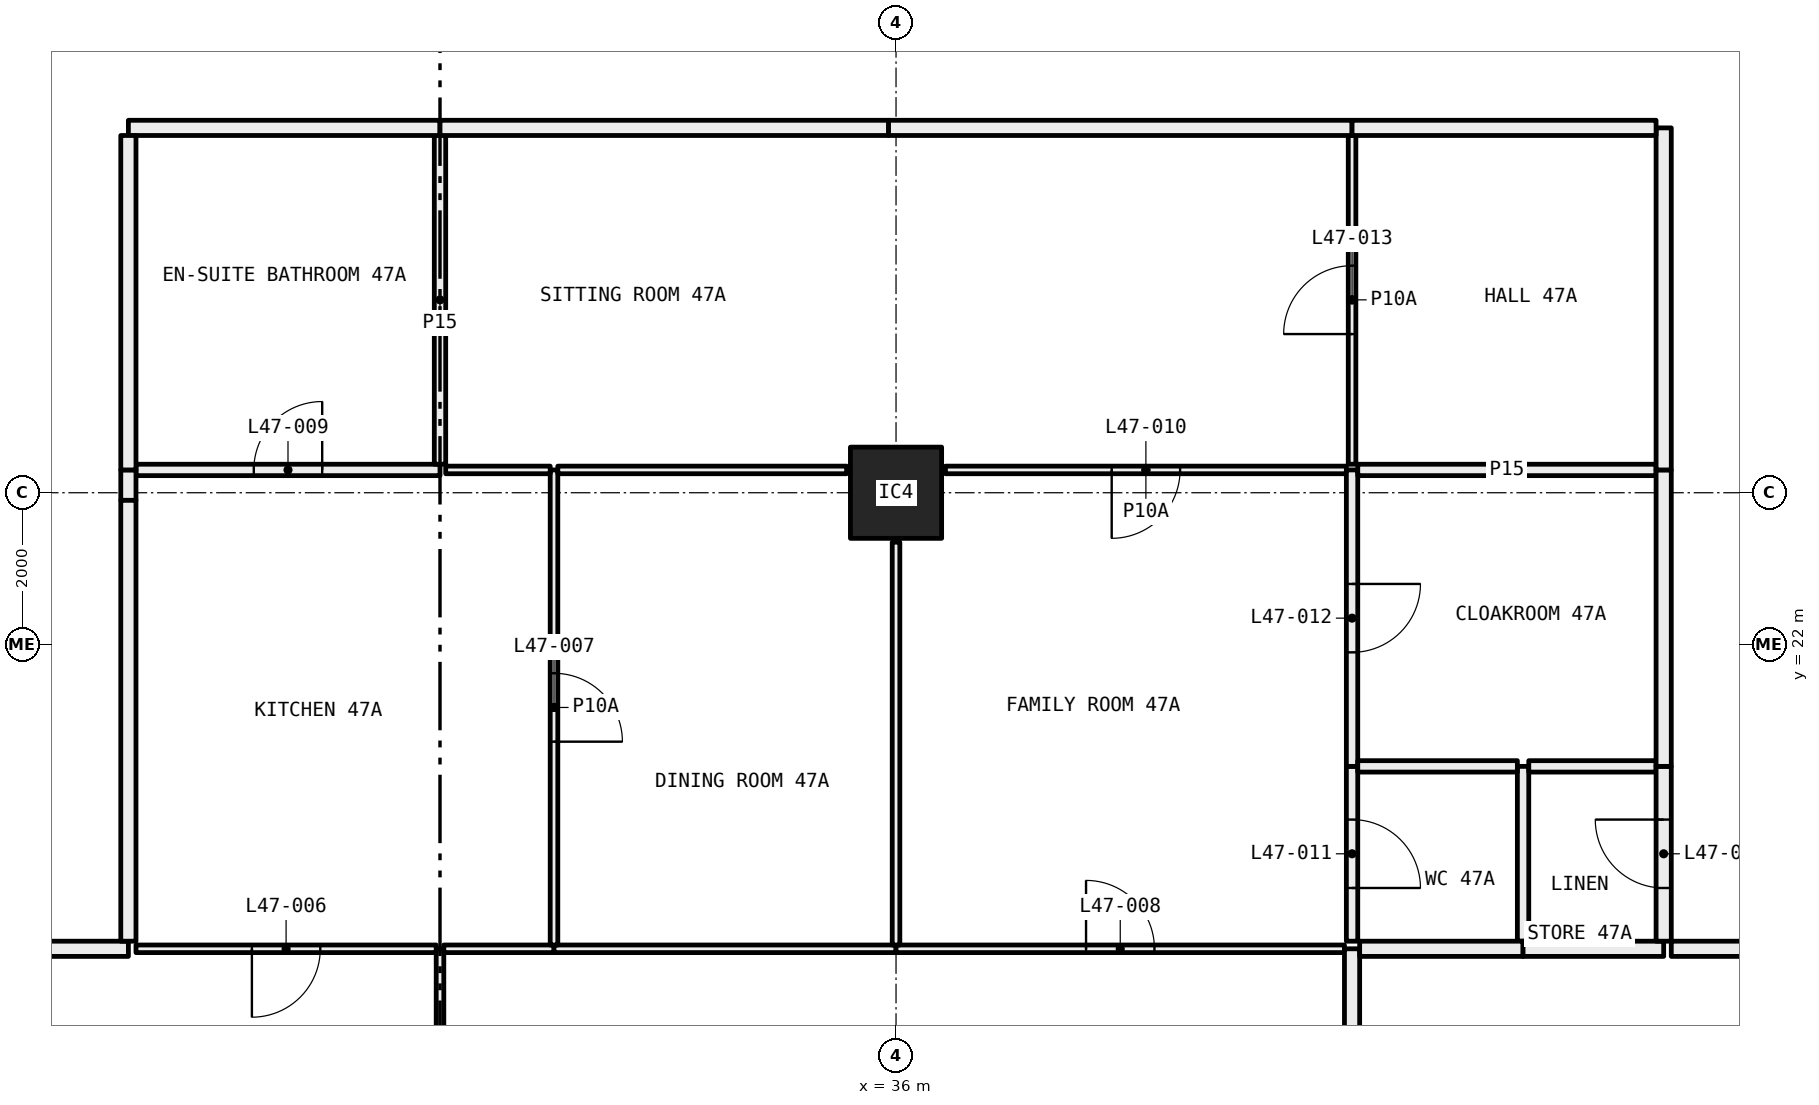
"""IFC4 building model, lengths in metres.
Left out: names, types, materials, properties, quantities, classifications, styles, units other than length and angle.
Written with IfcOpenShell. Run it as: python <this file> out.ifc"""

import sys

from ifc_helpers import new_model, si_unit, direction, frame, frame_2d, origin, origin_2d, place, context, subcontext, project, spatial, rectangle, hollow_rectangle, extrude, element, fill, save


model = new_model("IFC4")
c1 = context("Model", 3, precision=1e-05, world=origin(), true_north=direction((0.0, 1.0)))
c2 = subcontext(c1, "Body", "Model", "MODEL_VIEW")
j1 = project(units=[si_unit("LENGTHUNIT", "METRE"), si_unit("PLANEANGLEUNIT", "RADIAN")], contexts=[c1])
p1 = place(None, origin())
s1 = spatial("IfcSite", under=j1, at=p1, CompositionType="ELEMENT")
p2 = place(p1, origin())
s2 = spatial("IfcBuilding", under=s1, at=p2, CompositionType="ELEMENT")
p3 = place(p2, frame((0.0, 0.0, 178.95)))
s3 = spatial("IfcBuildingStorey", under=s2, at=p3, CompositionType="ELEMENT", Elevation=178.95)
p4 = place(p3, frame((36.0, 24.0, 0.0), z_axis=(0.0, 0.0, 1.0), x_axis=(1.0, 0.0, 0.0)))
e1 = element("IfcColumn", 1, at=p4, inside=s3, PredefinedType="COLUMN", context=c2, shape_type="SweptSolid", body=[
    extrude(hollow_rectangle(XDim=1.2, YDim=1.2, WallThickness=0.05, at=origin_2d()), origin(), (0.0, 0.0, 1.0), 3.05),
])
p5 = place(p3, frame((30.0, 12.72, 0.0), z_axis=(0.0, 0.0, 1.0), x_axis=(0.0, 1.0, 0.0)))
e2 = element("IfcWall", 2, at=p5, inside=s3, PredefinedType="PARTITIONING", context=c2, shape_type="SweptSolid", body=[
    extrude(rectangle(XDim=5.28, YDim=0.1, at=frame_2d((2.64, 0.0))), origin(), (0.0, 0.0, 1.0), 3.05),
])
p6 = place(p5, frame((2.19, 0.0, 0.0)))
e3 = element("IfcOpeningElement", 3, at=p6, cuts=e2, PredefinedType="OPENING", context=c2, shape_type="SweptSolid", body=[
    extrude(rectangle(XDim=0.9, YDim=2.1, at=frame_2d((0.45, 1.05))), frame((0.0, 0.06, 0.0), z_axis=(0.0, -1.0, 0.0), x_axis=(1.0, 0.0, 0.0)), (0.0, 0.0, 1.0), 0.12),
])
p7 = place(p3, frame((29.95, 18.0, 0.0), z_axis=(0.0, 0.0, 1.0), x_axis=(-1.0, 0.0, 0.0)))
e4 = element("IfcWall", 4, at=p7, inside=s3, PredefinedType="PARTITIONING", context=c2, shape_type="SweptSolid", body=[
    extrude(rectangle(XDim=3.95, YDim=0.1, at=frame_2d((1.975, 0.0))), origin(), (0.0, 0.0, 1.0), 3.05),
])
p8 = place(p7, frame((1.525, 0.0, 0.0)))
e5 = element("IfcOpeningElement", 5, at=p8, cuts=e4, PredefinedType="OPENING", context=c2, shape_type="SweptSolid", body=[
    extrude(rectangle(XDim=0.9, YDim=2.1, at=frame_2d((0.45, 1.05))), frame((0.0, 0.06, 0.0), z_axis=(0.0, -1.0, 0.0), x_axis=(1.0, 0.0, 0.0)), (0.0, 0.0, 1.0), 0.12),
])
p9 = place(p3, frame((25.9, 18.0, 0.0), z_axis=(0.0, 0.0, 1.0), x_axis=(-1.0, 0.0, 0.0)))
e6 = element("IfcWall", 6, at=p9, inside=s3, PredefinedType="PARTITIONING", context=c2, shape_type="SweptSolid", body=[
    extrude(rectangle(XDim=1.9, YDim=0.2, at=frame_2d((0.95, 0.0))), origin(), (0.0, 0.0, 1.0), 3.05),
])
p10 = place(p3, frame((31.5, 18.0, 0.0), z_axis=(0.0, 0.0, 1.0), x_axis=(-1.0, 0.0, 0.0)))
e7 = element("IfcWall", 7, at=p10, inside=s3, PredefinedType="PARTITIONING", context=c2, shape_type="SweptSolid", body=[
    extrude(rectangle(XDim=1.45, YDim=0.1, at=frame_2d((0.725, 0.0))), origin(), (0.0, 0.0, 1.0), 3.05),
])
p11 = place(p3, frame((36.0, 18.0, 0.0), z_axis=(0.0, 0.0, 1.0), x_axis=(-1.0, 0.0, 0.0)))
e8 = element("IfcWall", 8, at=p11, inside=s3, PredefinedType="PARTITIONING", context=c2, shape_type="SweptSolid", body=[
    extrude(rectangle(XDim=4.5, YDim=0.1, at=frame_2d((2.25, 0.0))), origin(), (0.0, 0.0, 1.0), 2.45),
])
p12 = place(p3, frame((41.9, 18.0, 0.0), z_axis=(0.0, 0.0, 1.0), x_axis=(-1.0, 0.0, 0.0)))
e9 = element("IfcWall", 9, at=p12, inside=s3, PredefinedType="PARTITIONING", context=c2, shape_type="SweptSolid", body=[
    extrude(rectangle(XDim=5.9, YDim=0.1, at=frame_2d((2.95, 0.0))), origin(), (0.0, 0.0, 1.0), 2.45),
])
p13 = place(p12, frame((2.5, 0.0, 0.0)))
e10 = element("IfcOpeningElement", 10, at=p13, cuts=e9, PredefinedType="OPENING", context=c2, shape_type="SweptSolid", body=[
    extrude(rectangle(XDim=0.9, YDim=2.1, at=frame_2d((0.45, 1.05))), frame((0.0, 0.06, 0.0), z_axis=(0.0, -1.0, 0.0), x_axis=(1.0, 0.0, 0.0)), (0.0, 0.0, 1.0), 0.12),
])
p14 = place(p3, frame((42.0, 12.72, 0.0), z_axis=(0.0, 0.0, 1.0), x_axis=(0.0, 1.0, 0.0)))
e11 = element("IfcWall", 11, at=p14, inside=s3, PredefinedType="PARTITIONING", context=c2, shape_type="SweptSolid", body=[
    extrude(rectangle(XDim=5.28, YDim=0.2, at=frame_2d((2.64, 0.0))), origin(), (0.0, 0.0, 1.0), 3.05),
])
p15 = place(p3, frame((31.5, 18.05, 0.0), z_axis=(0.0, 0.0, 1.0), x_axis=(0.0, 1.0, 0.0)))
e12 = element("IfcWall", 12, at=p15, inside=s3, PredefinedType="PARTITIONING", context=c2, shape_type="SweptSolid", body=[
    extrude(rectangle(XDim=6.25, YDim=0.1, at=frame_2d((3.125, 0.0))), origin(), (0.0, 0.0, 1.0), 2.45),
])
p16 = place(p15, frame((2.675, 0.0, 0.0)))
e13 = element("IfcOpeningElement", 13, at=p16, cuts=e12, PredefinedType="OPENING", context=c2, shape_type="SweptSolid", body=[
    extrude(rectangle(XDim=0.9, YDim=2.1, at=frame_2d((0.45, 1.05))), frame((0.0, 0.06, 0.0), z_axis=(0.0, -1.0, 0.0), x_axis=(1.0, 0.0, 0.0)), (0.0, 0.0, 1.0), 0.12),
])
p17 = place(p3, frame((30.0, 24.3, 0.0), z_axis=(0.0, 0.0, 1.0), x_axis=(-1.0, 0.0, 0.0)))
e14 = element("IfcWall", 14, at=p17, inside=s3, PredefinedType="PARTITIONING", context=c2, shape_type="SweptSolid", body=[
    extrude(rectangle(XDim=4.0, YDim=0.15, at=frame_2d((2.0, 0.0))), origin(), (0.0, 0.0, 1.0), 3.05),
])
p18 = place(p17, frame((1.55, 0.0, 0.0)))
e15 = element("IfcOpeningElement", 15, at=p18, cuts=e14, PredefinedType="OPENING", context=c2, shape_type="SweptSolid", body=[
    extrude(rectangle(XDim=0.9, YDim=2.1, at=frame_2d((0.45, 1.05))), frame((0.0, 0.085, 0.0), z_axis=(0.0, -1.0, 0.0), x_axis=(1.0, 0.0, 0.0)), (0.0, 0.0, 1.0), 0.17),
])
p19 = place(p3, frame((31.45, 24.3, 0.0), z_axis=(0.0, 0.0, 1.0), x_axis=(-1.0, 0.0, 0.0)))
e16 = element("IfcWall", 16, at=p19, inside=s3, PredefinedType="PARTITIONING", context=c2, shape_type="SweptSolid", body=[
    extrude(rectangle(XDim=1.375, YDim=0.1, at=frame_2d((0.688, 0.0))), origin(), (0.0, 0.0, 1.0), 3.05),
])
p20 = place(p3, frame((25.9, 24.3, 0.0), z_axis=(0.0, 0.0, 1.0), x_axis=(0.0, -1.0, 0.0)))
e17 = element("IfcWall", 17, at=p20, inside=s3, PredefinedType="PARTITIONING", context=c2, shape_type="SweptSolid", body=[
    extrude(rectangle(XDim=0.4, YDim=0.2, at=frame_2d((0.2, 0.0))), origin(), (0.0, 0.0, 1.0), 2.45),
])
p21 = place(p3, frame((25.9, 23.9, 0.0), z_axis=(0.0, 0.0, 1.0), x_axis=(0.0, -1.0, 0.0)))
e18 = element("IfcWall", 18, at=p21, inside=s3, PredefinedType="PARTITIONING", context=c2, shape_type="SweptSolid", body=[
    extrude(rectangle(XDim=5.8, YDim=0.2, at=frame_2d((2.9, 0.0))), origin(), (0.0, 0.0, 1.0), 3.05),
])
p22 = place(p3, frame((36.0, 18.05, 0.0), z_axis=(0.0, 0.0, 1.0), x_axis=(0.0, 1.0, 0.0)))
e19 = element("IfcWall", 19, at=p22, inside=s3, PredefinedType="PARTITIONING", context=c2, shape_type="SweptSolid", body=[
    extrude(rectangle(XDim=5.3, YDim=0.1, at=frame_2d((2.65, 0.0))), origin(), (0.0, 0.0, 1.0), 2.45),
])
p23 = place(p3, frame((35.35, 24.3, 0.0), z_axis=(0.0, 0.0, 1.0), x_axis=(-1.0, 0.0, 0.0)))
e20 = element("IfcWall", 20, at=p23, inside=s3, PredefinedType="PARTITIONING", context=c2, shape_type="SweptSolid", body=[
    extrude(rectangle(XDim=3.8, YDim=0.1, at=frame_2d((1.9, 0.0))), origin(), (0.0, 0.0, 1.0), 3.05),
])
p24 = place(p3, frame((41.925, 24.3, 0.0), z_axis=(0.0, 0.0, 1.0), x_axis=(-1.0, 0.0, 0.0)))
e21 = element("IfcWall", 21, at=p24, inside=s3, PredefinedType="PARTITIONING", context=c2, shape_type="SweptSolid", body=[
    extrude(rectangle(XDim=5.275, YDim=0.1, at=frame_2d((2.638, 0.0))), origin(), (0.0, 0.0, 1.0), 3.05),
])
p25 = place(p24, frame((2.188, 0.0, 0.0)))
e22 = element("IfcOpeningElement", 22, at=p25, cuts=e21, PredefinedType="OPENING", context=c2, shape_type="SweptSolid", body=[
    extrude(rectangle(XDim=0.9, YDim=2.1, at=frame_2d((0.45, 1.05))), frame((0.0, 0.06, 0.0), z_axis=(0.0, -1.0, 0.0), x_axis=(1.0, 0.0, 0.0)), (0.0, 0.0, 1.0), 0.12),
])
p26 = place(p3, frame((42.0, 18.1, 0.0), z_axis=(0.0, 0.0, 1.0), x_axis=(0.0, 1.0, 0.0)))
e23 = element("IfcWall", 23, at=p26, inside=s3, PredefinedType="PARTITIONING", context=c2, shape_type="SweptSolid", body=[
    extrude(rectangle(XDim=2.3, YDim=0.15, at=frame_2d((1.15, 0.0))), origin(), (0.0, 0.0, 1.0), 3.05),
])
p27 = place(p26, frame((0.7, 0.0, 0.0)))
e24 = element("IfcOpeningElement", 24, at=p27, cuts=e23, PredefinedType="OPENING", context=c2, shape_type="SweptSolid", body=[
    extrude(rectangle(XDim=0.9, YDim=2.1, at=frame_2d((0.45, 1.05))), frame((0.0, 0.085, 0.0), z_axis=(0.0, -1.0, 0.0), x_axis=(1.0, 0.0, 0.0)), (0.0, 0.0, 1.0), 0.17),
])
p28 = place(p3, frame((42.0, 20.4, 0.0), z_axis=(0.0, 0.0, 1.0), x_axis=(0.0, 1.0, 0.0)))
e25 = element("IfcWall", 25, at=p28, inside=s3, PredefinedType="PARTITIONING", context=c2, shape_type="SweptSolid", body=[
    extrude(rectangle(XDim=3.9, YDim=0.15, at=frame_2d((1.95, 0.0))), origin(), (0.0, 0.0, 1.0), 2.45),
])
p29 = place(p28, frame((1.5, 0.0, 0.0)))
e26 = element("IfcOpeningElement", 26, at=p29, cuts=e25, PredefinedType="OPENING", context=c2, shape_type="SweptSolid", body=[
    extrude(rectangle(XDim=0.9, YDim=2.1, at=frame_2d((0.45, 1.05))), frame((0.0, 0.085, 0.0), z_axis=(0.0, -1.0, 0.0), x_axis=(1.0, 0.0, 0.0)), (0.0, 0.0, 1.0), 0.17),
])
p30 = place(p3, frame((30.0, 24.375, 0.0), z_axis=(0.0, 0.0, 1.0), x_axis=(0.0, 1.0, 0.0)))
e27 = element("IfcWall", 27, at=p30, inside=s3, PredefinedType="PARTITIONING", context=c2, shape_type="SweptSolid", body=[
    extrude(rectangle(XDim=4.325, YDim=0.15, at=frame_2d((2.163, 0.0))), origin(), (0.0, 0.0, 1.0), 3.05),
])
p31 = place(p3, frame((30.0, 28.8, 0.0), z_axis=(0.0, 0.0, 1.0), x_axis=(-1.0, 0.0, 0.0)))
e28 = element("IfcWall", 28, at=p31, inside=s3, PredefinedType="PARTITIONING", context=c2, shape_type="SweptSolid", body=[
    extrude(rectangle(XDim=4.1, YDim=0.2, at=frame_2d((2.05, 0.0))), origin(), (0.0, 0.0, 1.0), 3.05),
])
p32 = place(p3, frame((25.9, 28.7, 0.0), z_axis=(0.0, 0.0, 1.0), x_axis=(0.0, -1.0, 0.0)))
e29 = element("IfcWall", 29, at=p32, inside=s3, PredefinedType="PARTITIONING", context=c2, shape_type="SweptSolid", body=[
    extrude(rectangle(XDim=4.4, YDim=0.2, at=frame_2d((2.2, 0.0))), origin(), (0.0, 0.0, 1.0), 3.05),
])
p33 = place(p3, frame((42.0, 24.375, 0.0), z_axis=(0.0, 0.0, 1.0), x_axis=(0.0, 1.0, 0.0)))
e30 = element("IfcWall", 30, at=p33, inside=s3, PredefinedType="PARTITIONING", context=c2, shape_type="SweptSolid", body=[
    extrude(rectangle(XDim=4.325, YDim=0.1, at=frame_2d((2.163, 0.0))), origin(), (0.0, 0.0, 1.0), 3.05),
])
p34 = place(p33, frame((1.712, 0.0, 0.0)))
e31 = element("IfcOpeningElement", 31, at=p34, cuts=e30, PredefinedType="OPENING", context=c2, shape_type="SweptSolid", body=[
    extrude(rectangle(XDim=0.9, YDim=2.1, at=frame_2d((0.45, 1.05))), frame((0.0, 0.06, 0.0), z_axis=(0.0, -1.0, 0.0), x_axis=(1.0, 0.0, 0.0)), (0.0, 0.0, 1.0), 0.12),
])
p35 = place(p3, frame((42.0, 28.8, 0.0), z_axis=(0.0, 0.0, 1.0), x_axis=(-1.0, 0.0, 0.0)))
e32 = element("IfcWall", 32, at=p35, inside=s3, PredefinedType="PARTITIONING", context=c2, shape_type="SweptSolid", body=[
    extrude(rectangle(XDim=6.1, YDim=0.2, at=frame_2d((3.05, 0.0))), origin(), (0.0, 0.0, 1.0), 2.45),
])
p36 = place(p3, frame((35.9, 28.8, 0.0), z_axis=(0.0, 0.0, 1.0), x_axis=(-1.0, 0.0, 0.0)))
e33 = element("IfcWall", 33, at=p36, inside=s3, PredefinedType="PARTITIONING", context=c2, shape_type="SweptSolid", body=[
    extrude(rectangle(XDim=5.9, YDim=0.2, at=frame_2d((2.95, 0.0))), origin(), (0.0, 0.0, 1.0), 3.05),
])
p37 = place(p3, frame((44.25, 18.1, 0.0), z_axis=(0.0, 0.0, 1.0), x_axis=(0.0, 1.0, 0.0)))
e34 = element("IfcWall", 34, at=p37, inside=s3, PredefinedType="PARTITIONING", context=c2, shape_type="SweptSolid", body=[
    extrude(rectangle(XDim=2.3, YDim=0.15, at=frame_2d((1.15, 0.0))), origin(), (0.0, 0.0, 1.0), 3.05),
])
p38 = place(p3, frame((44.175, 20.4, 0.0), z_axis=(0.0, 0.0, 1.0), x_axis=(-1.0, 0.0, 0.0)))
e35 = element("IfcWall", 35, at=p38, inside=s3, PredefinedType="PARTITIONING", context=c2, shape_type="SweptSolid", body=[
    extrude(rectangle(XDim=2.1, YDim=0.15, at=frame_2d((1.05, 0.0))), origin(), (0.0, 0.0, 1.0), 3.05),
])
p39 = place(p3, frame((42.1, 18.0, 0.0), z_axis=(0.0, 0.0, 1.0), x_axis=(1.0, 0.0, 0.0)))
e36 = element("IfcWall", 36, at=p39, inside=s3, PredefinedType="PARTITIONING", context=c2, shape_type="SweptSolid", body=[
    extrude(rectangle(XDim=2.15, YDim=0.2, at=frame_2d((1.075, 0.0))), origin(), (0.0, 0.0, 1.0), 3.05),
])
p40 = place(p3, frame((46.0, 20.4, 0.0), z_axis=(0.0, 0.0, 1.0), x_axis=(-1.0, 0.0, 0.0)))
e37 = element("IfcWall", 37, at=p40, inside=s3, PredefinedType="PARTITIONING", context=c2, shape_type="SweptSolid", body=[
    extrude(rectangle(XDim=1.675, YDim=0.15, at=frame_2d((0.837, 0.0))), origin(), (0.0, 0.0, 1.0), 3.05),
])
p41 = place(p3, frame((44.25, 18.0, 0.0), z_axis=(0.0, 0.0, 1.0), x_axis=(1.0, 0.0, 0.0)))
e38 = element("IfcWall", 38, at=p41, inside=s3, PredefinedType="PARTITIONING", context=c2, shape_type="SweptSolid", body=[
    extrude(rectangle(XDim=1.85, YDim=0.2, at=frame_2d((0.925, 0.0))), origin(), (0.0, 0.0, 1.0), 3.05),
])
p42 = place(p3, frame((46.1, 18.1, 0.0), z_axis=(0.0, 0.0, 1.0), x_axis=(0.0, 1.0, 0.0)))
e39 = element("IfcWall", 39, at=p42, inside=s3, PredefinedType="PARTITIONING", context=c2, shape_type="SweptSolid", body=[
    extrude(rectangle(XDim=2.3, YDim=0.2, at=frame_2d((1.15, 0.0))), origin(), (0.0, 0.0, 1.0), 3.05),
])
p43 = place(p42, frame((0.7, 0.0, 0.0)))
e40 = element("IfcOpeningElement", 40, at=p43, cuts=e39, PredefinedType="OPENING", context=c2, shape_type="SweptSolid", body=[
    extrude(rectangle(XDim=0.9, YDim=2.1, at=frame_2d((0.45, 1.05))), frame((0.0, 0.11, 0.0), z_axis=(0.0, -1.0, 0.0), x_axis=(1.0, 0.0, 0.0)), (0.0, 0.0, 1.0), 0.22),
])
p44 = place(p3, frame((46.0, 24.3, 0.0), z_axis=(0.0, 0.0, 1.0), x_axis=(-1.0, 0.0, 0.0)))
e41 = element("IfcWall", 41, at=p44, inside=s3, PredefinedType="PARTITIONING", context=c2, shape_type="SweptSolid", body=[
    extrude(rectangle(XDim=3.925, YDim=0.15, at=frame_2d((1.962, 0.0))), origin(), (0.0, 0.0, 1.0), 3.05),
])
p45 = place(p3, frame((46.1, 20.4, 0.0), z_axis=(0.0, 0.0, 1.0), x_axis=(0.0, 1.0, 0.0)))
e42 = element("IfcWall", 42, at=p45, inside=s3, PredefinedType="PARTITIONING", context=c2, shape_type="SweptSolid", body=[
    extrude(rectangle(XDim=3.9, YDim=0.2, at=frame_2d((1.95, 0.0))), origin(), (0.0, 0.0, 1.0), 2.45),
])
p46 = place(p3, frame((46.1, 24.3, 0.0), z_axis=(0.0, 0.0, 1.0), x_axis=(0.0, 1.0, 0.0)))
e43 = element("IfcWall", 43, at=p46, inside=s3, PredefinedType="PARTITIONING", context=c2, shape_type="SweptSolid", body=[
    extrude(rectangle(XDim=4.5, YDim=0.2, at=frame_2d((2.25, 0.0))), origin(), (0.0, 0.0, 1.0), 3.05),
])
p47 = place(p3, frame((46.0, 28.8, 0.0), z_axis=(0.0, 0.0, 1.0), x_axis=(-1.0, 0.0, 0.0)))
e44 = element("IfcWall", 44, at=p47, inside=s3, PredefinedType="PARTITIONING", context=c2, shape_type="SweptSolid", body=[
    extrude(rectangle(XDim=4.0, YDim=0.2, at=frame_2d((2.0, 0.0))), origin(), (0.0, 0.0, 1.0), 3.05),
])
p48 = place(p3, frame((53.28, 18.0, 0.0), z_axis=(0.0, 0.0, 1.0), x_axis=(-1.0, 0.0, 0.0)))
e45 = element("IfcWall", 45, at=p48, inside=s3, PredefinedType="PARTITIONING", context=c2, shape_type="SweptSolid", body=[
    extrude(rectangle(XDim=7.08, YDim=0.2, at=frame_2d((3.54, 0.0))), origin(), (0.0, 0.0, 1.0), 3.05),
])
p49 = place(p48, frame((3.09, 0.0, 0.0)))
e46 = element("IfcOpeningElement", 46, at=p49, cuts=e45, PredefinedType="OPENING", context=c2, shape_type="SweptSolid", body=[
    extrude(rectangle(XDim=0.9, YDim=2.1, at=frame_2d((0.45, 1.05))), frame((0.0, 0.11, 0.0), z_axis=(0.0, -1.0, 0.0), x_axis=(1.0, 0.0, 0.0)), (0.0, 0.0, 1.0), 0.22),
])
p50 = place(p8, origin())
e47 = element("IfcDoor", 47, at=p50, inside=s3, OperationType="SINGLE_SWING_LEFT", PredefinedType="DOOR", context=c2, shape_type="SweptSolid", body=[
    extrude(rectangle(XDim=0.9, YDim=2.1, at=frame_2d((0.45, 1.05))), frame((0.0, 0.025, 0.0), z_axis=(0.0, -1.0, 0.0), x_axis=(1.0, 0.0, 0.0)), (0.0, 0.0, 1.0), 0.05),
])
fill(e5, e47)
p51 = place(p16, frame((0.9, 0.0, 0.0), x_axis=(-1.0, 0.0, 0.0)))
e48 = element("IfcDoor", 48, at=p51, inside=s3, OperationType="SINGLE_SWING_LEFT", PredefinedType="DOOR", context=c2, shape_type="SweptSolid", body=[
    extrude(rectangle(XDim=0.9, YDim=2.1, at=frame_2d((0.45, 1.05))), frame((0.0, 0.025, 0.0), z_axis=(0.0, -1.0, 0.0), x_axis=(1.0, 0.0, 0.0)), (0.0, 0.0, 1.0), 0.05),
])
fill(e13, e48)
p52 = place(p13, frame((0.9, 0.0, 0.0), x_axis=(-1.0, 0.0, 0.0)))
e49 = element("IfcDoor", 49, at=p52, inside=s3, OperationType="SINGLE_SWING_RIGHT", PredefinedType="DOOR", context=c2, shape_type="SweptSolid", body=[
    extrude(rectangle(XDim=0.9, YDim=2.1, at=frame_2d((0.45, 1.05))), frame((0.0, 0.025, 0.0), z_axis=(0.0, -1.0, 0.0), x_axis=(1.0, 0.0, 0.0)), (0.0, 0.0, 1.0), 0.05),
])
fill(e10, e49)
p53 = place(p18, frame((0.9, 0.0, 0.0), x_axis=(-1.0, 0.0, 0.0)))
e50 = element("IfcDoor", 50, at=p53, inside=s3, OperationType="SINGLE_SWING_LEFT", PredefinedType="DOOR", context=c2, shape_type="SweptSolid", body=[
    extrude(rectangle(XDim=0.9, YDim=2.1, at=frame_2d((0.45, 1.05))), frame((0.0, 0.025, 0.0), z_axis=(0.0, -1.0, 0.0), x_axis=(1.0, 0.0, 0.0)), (0.0, 0.0, 1.0), 0.05),
])
fill(e15, e50)
p54 = place(p25, origin())
e51 = element("IfcDoor", 51, at=p54, inside=s3, OperationType="SINGLE_SWING_LEFT", PredefinedType="DOOR", context=c2, shape_type="SweptSolid", body=[
    extrude(rectangle(XDim=0.9, YDim=2.1, at=frame_2d((0.45, 1.05))), frame((0.0, 0.025, 0.0), z_axis=(0.0, -1.0, 0.0), x_axis=(1.0, 0.0, 0.0)), (0.0, 0.0, 1.0), 0.05),
])
fill(e22, e51)
p55 = place(p27, frame((0.9, 0.0, 0.0), x_axis=(-1.0, 0.0, 0.0)))
e52 = element("IfcDoor", 52, at=p55, inside=s3, OperationType="SINGLE_SWING_LEFT", PredefinedType="DOOR", context=c2, shape_type="SweptSolid", body=[
    extrude(rectangle(XDim=0.9, YDim=2.1, at=frame_2d((0.45, 1.05))), frame((0.0, 0.025, 0.0), z_axis=(0.0, -1.0, 0.0), x_axis=(1.0, 0.0, 0.0)), (0.0, 0.0, 1.0), 0.05),
])
fill(e24, e52)
p56 = place(p29, frame((0.9, 0.0, 0.0), x_axis=(-1.0, 0.0, 0.0)))
e53 = element("IfcDoor", 53, at=p56, inside=s3, OperationType="SINGLE_SWING_RIGHT", PredefinedType="DOOR", context=c2, shape_type="SweptSolid", body=[
    extrude(rectangle(XDim=0.9, YDim=2.1, at=frame_2d((0.45, 1.05))), frame((0.0, 0.025, 0.0), z_axis=(0.0, -1.0, 0.0), x_axis=(1.0, 0.0, 0.0)), (0.0, 0.0, 1.0), 0.05),
])
fill(e26, e53)
p57 = place(p34, origin())
e54 = element("IfcDoor", 54, at=p57, inside=s3, OperationType="SINGLE_SWING_RIGHT", PredefinedType="DOOR", context=c2, shape_type="SweptSolid", body=[
    extrude(rectangle(XDim=0.9, YDim=2.1, at=frame_2d((0.45, 1.05))), frame((0.0, 0.025, 0.0), z_axis=(0.0, -1.0, 0.0), x_axis=(1.0, 0.0, 0.0)), (0.0, 0.0, 1.0), 0.05),
])
fill(e31, e54)
p58 = place(p43, origin())
e55 = element("IfcDoor", 55, at=p58, inside=s3, OperationType="SINGLE_SWING_LEFT", PredefinedType="DOOR", context=c2, shape_type="SweptSolid", body=[
    extrude(rectangle(XDim=0.9, YDim=2.1, at=frame_2d((0.45, 1.05))), frame((0.0, 0.025, 0.0), z_axis=(0.0, -1.0, 0.0), x_axis=(1.0, 0.0, 0.0)), (0.0, 0.0, 1.0), 0.05),
])
fill(e40, e55)
save(model, sys.argv[1])
